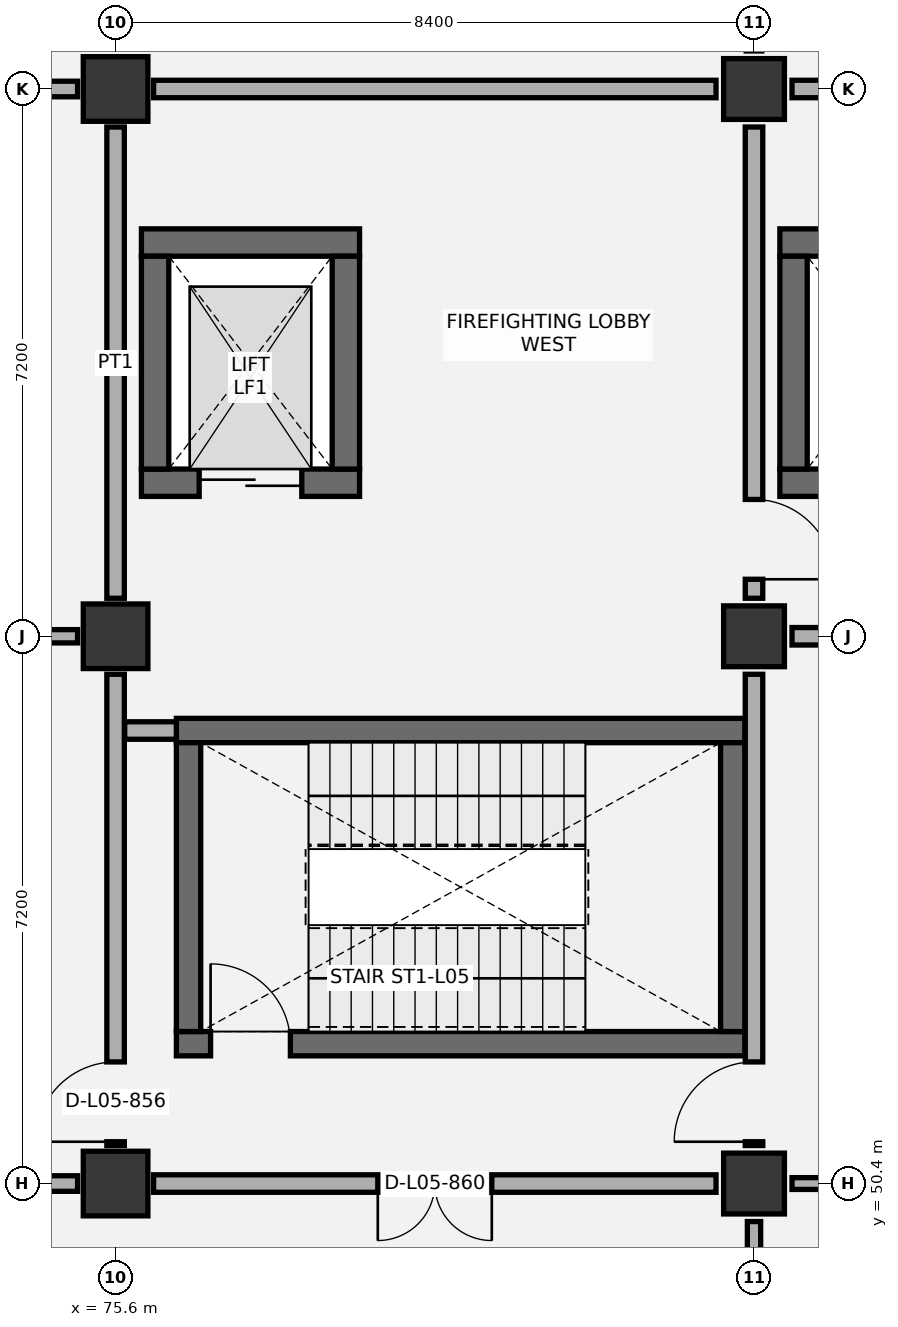
"""IFC4 building model, lengths in metres.
Left out: names, types, materials, properties, quantities, classifications, styles, units other than length and angle.
Written with IfcOpenShell. Run it as: python <this file> out.ifc"""

import sys

from ifc_helpers import new_model, si_unit, direction, frame, frame_2d, origin, origin_2d, place, context, subcontext, project, spatial, rectangle, extrude, element, fill, save


model = new_model("IFC4")
c1 = context("Model", 3, precision=1e-05, world=origin(), true_north=direction((0.0, 1.0)))
c2 = subcontext(c1, "Body", "Model", "MODEL_VIEW")
j1 = project(units=[si_unit("LENGTHUNIT", "METRE"), si_unit("PLANEANGLEUNIT", "RADIAN")], contexts=[c1])
p1 = place(None, origin())
s1 = spatial("IfcSite", under=j1, at=p1, CompositionType="ELEMENT")
p2 = place(p1, origin())
s2 = spatial("IfcBuilding", under=s1, at=p2, CompositionType="ELEMENT")
p3 = place(p2, frame((0.0, 0.0, 27.0)))
s3 = spatial("IfcBuildingStorey", under=s2, at=p3, CompositionType="ELEMENT", Elevation=27.0)
for number, where, z_axis, x_axis in (
    (1, (75.6, 50.4, 0.0), (0.0, 0.0, 1.0), (1.0, 0.0, 0.0)),
    (2, (75.6, 57.6, 0.0), (0.0, 0.0, 1.0), (1.0, 0.0, 0.0)),
    (3, (75.6, 64.8, 0.0), (0.0, 0.0, 1.0), (1.0, 0.0, 0.0)),
):
    element("IfcColumn", number, at=place(p3, frame(where, z_axis=z_axis, x_axis=x_axis)), inside=s3, PredefinedType="COLUMN", context=c2, shape_type="SweptSolid", body=[
        extrude(rectangle(XDim=0.85, YDim=0.85, at=origin_2d()), origin(), (0.0, 0.0, 1.0), 4.2),
    ])
for number, where, z_axis, x_axis in (
    (4, (84.0, 50.4, 0.0), (0.0, 0.0, 1.0), (1.0, 0.0, 0.0)),
    (5, (84.0, 57.6, 0.0), (0.0, 0.0, 1.0), (1.0, 0.0, 0.0)),
    (6, (84.0, 64.8, 0.0), (0.0, 0.0, 1.0), (1.0, 0.0, 0.0)),
):
    element("IfcColumn", number, at=place(p3, frame(where, z_axis=z_axis, x_axis=x_axis)), inside=s3, PredefinedType="COLUMN", context=c2, shape_type="SweptSolid", body=[
        extrude(rectangle(XDim=0.8, YDim=0.8, at=origin_2d()), origin(), (0.0, 0.0, 1.0), 4.2),
    ])
p4 = place(p3, frame((76.4, 52.24, 0.0), z_axis=(0.0, 0.0, 1.0), x_axis=(1.0, 0.0, 0.0)))
e7 = element("IfcWall", 7, at=p4, inside=s3, PredefinedType="SHEAR", context=c2, shape_type="SweptSolid", body=[
    extrude(rectangle(XDim=7.48, YDim=0.32, at=frame_2d((3.74, 0.0))), origin(), (0.0, 0.0, 1.0), 3.92),
])
p5 = place(p4, frame((0.45, 0.0, 0.0)))
e8 = element("IfcOpeningElement", 8, at=p5, cuts=e7, PredefinedType="OPENING", context=c2, shape_type="SweptSolid", body=[
    extrude(rectangle(XDim=1.05, YDim=2.15, at=frame_2d((0.525, 1.075))), frame((0.0, 0.17, 0.0), z_axis=(0.0, -1.0, 0.0), x_axis=(1.0, 0.0, 0.0)), (0.0, 0.0, 1.0), 0.34),
])
p6 = place(p3, frame((76.4, 56.36, 0.0), z_axis=(0.0, 0.0, 1.0), x_axis=(1.0, 0.0, 0.0)))
e9 = element("IfcWall", 9, at=p6, inside=s3, PredefinedType="SHEAR", context=c2, shape_type="SweptSolid", body=[
    extrude(rectangle(XDim=7.48, YDim=0.32, at=frame_2d((3.74, 0.0))), origin(), (0.0, 0.0, 1.0), 3.92),
])
for number, where, z_axis, x_axis in (
    (10, (76.56, 52.4, 0.0), (0.0, 0.0, 1.0), (0.0, 1.0, 0.0)),
    (11, (83.72, 52.4, 0.0), (0.0, 0.0, 1.0), (0.0, 1.0, 0.0)),
):
    element("IfcWall", number, at=place(p3, frame(where, z_axis=z_axis, x_axis=x_axis)), inside=s3, PredefinedType="SHEAR", context=c2, shape_type="SweptSolid", body=[
        extrude(rectangle(XDim=3.8, YDim=0.32, at=frame_2d((1.9, 0.0))), origin(), (0.0, 0.0, 1.0), 3.92),
    ])
p7 = place(p3, frame((75.94, 62.78, 0.0), z_axis=(0.0, 0.0, 1.0), x_axis=(1.0, 0.0, 0.0)))
e12 = element("IfcWall", 12, at=p7, inside=s3, PredefinedType="SHEAR", context=c2, shape_type="SweptSolid", body=[
    extrude(rectangle(XDim=2.87, YDim=0.36, at=frame_2d((1.435, 0.0))), origin(), (0.0, 0.0, 1.0), 3.92),
])
p8 = place(p3, frame((75.94, 59.62, 0.0), z_axis=(0.0, 0.0, 1.0), x_axis=(1.0, 0.0, 0.0)))
e13 = element("IfcWall", 13, at=p8, inside=s3, PredefinedType="SHEAR", context=c2, shape_type="SweptSolid", body=[
    extrude(rectangle(XDim=2.87, YDim=0.36, at=frame_2d((1.435, 0.0))), origin(), (0.0, 0.0, 1.0), 3.92),
])
p9 = place(p8, frame((0.76, 0.0, 0.0)))
e14 = element("IfcOpeningElement", 14, at=p9, cuts=e13, PredefinedType="OPENING", context=c2, shape_type="SweptSolid", body=[
    extrude(rectangle(XDim=1.35, YDim=2.2, at=frame_2d((0.675, 1.1))), frame((0.0, 0.19, 0.0), z_axis=(0.0, -1.0, 0.0), x_axis=(1.0, 0.0, 0.0)), (0.0, 0.0, 1.0), 0.38),
])
for number, where, z_axis, x_axis in (
    (15, (76.12, 59.8, 0.0), (0.0, 0.0, 1.0), (0.0, 1.0, 0.0)),
    (16, (78.63, 59.8, 0.0), (0.0, 0.0, 1.0), (0.0, 1.0, 0.0)),
):
    element("IfcWall", number, at=place(p3, frame(where, z_axis=z_axis, x_axis=x_axis)), inside=s3, PredefinedType="SHEAR", context=c2, shape_type="SweptSolid", body=[
        extrude(rectangle(XDim=2.8, YDim=0.36, at=frame_2d((1.4, 0.0))), origin(), (0.0, 0.0, 1.0), 3.92),
    ])
p10 = place(p3, frame((84.34, 62.78, 0.0), z_axis=(0.0, 0.0, 1.0), x_axis=(1.0, 0.0, 0.0)))
e17 = element("IfcWall", 17, at=p10, inside=s3, PredefinedType="SHEAR", context=c2, shape_type="SweptSolid", body=[
    extrude(rectangle(XDim=7.77, YDim=0.36, at=frame_2d((3.885, 0.0))), origin(), (0.0, 0.0, 1.0), 3.92),
])
p11 = place(p3, frame((84.34, 59.62, 0.0), z_axis=(0.0, 0.0, 1.0), x_axis=(1.0, 0.0, 0.0)))
e18 = element("IfcWall", 18, at=p11, inside=s3, PredefinedType="SHEAR", context=c2, shape_type="SweptSolid", body=[
    extrude(rectangle(XDim=2.66, YDim=0.36, at=frame_2d((1.33, 0.0))), origin(), (0.0, 0.0, 1.0), 3.92),
])
p12 = place(p11, frame((0.78, 0.0, 0.0)))
e19 = element("IfcOpeningElement", 19, at=p12, cuts=e18, PredefinedType="OPENING", context=c2, shape_type="SweptSolid", body=[
    extrude(rectangle(XDim=1.1, YDim=2.15, at=frame_2d((0.55, 1.075))), frame((0.0, 0.19, 0.0), z_axis=(0.0, -1.0, 0.0), x_axis=(1.0, 0.0, 0.0)), (0.0, 0.0, 1.0), 0.38),
])
p13 = place(p3, frame((84.52, 59.8, 0.0), z_axis=(0.0, 0.0, 1.0), x_axis=(0.0, 1.0, 0.0)))
e20 = element("IfcWall", 20, at=p13, inside=s3, PredefinedType="SHEAR", context=c2, shape_type="SweptSolid", body=[
    extrude(rectangle(XDim=2.8, YDim=0.36, at=frame_2d((1.4, 0.0))), origin(), (0.0, 0.0, 1.0), 3.92),
])
p14 = place(p3, frame((67.7, 50.4, 0.0), z_axis=(0.0, 0.0, 1.0), x_axis=(1.0, 0.0, 0.0)))
e21 = element("IfcWall", 21, at=p14, inside=s3, PredefinedType="PARTITIONING", context=c2, shape_type="SweptSolid", body=[
    extrude(rectangle(XDim=7.4, YDim=0.205, at=frame_2d((3.7, 0.0))), origin(), (0.0, 0.0, 1.0), 3.215),
])
p15 = place(p14, frame((2.95, 0.0, 0.0)))
e22 = element("IfcOpeningElement", 22, at=p15, cuts=e21, PredefinedType="OPENING", context=c2, shape_type="SweptSolid", body=[
    extrude(rectangle(XDim=1.5, YDim=2.2, at=frame_2d((0.75, 1.1))), frame((0.0, 0.113, 0.0), z_axis=(0.0, -1.0, 0.0), x_axis=(1.0, 0.0, 0.0)), (0.0, 0.0, 1.0), 0.225),
])
p16 = place(p3, frame((75.6, 50.9, 0.0), z_axis=(0.0, 0.0, 1.0), x_axis=(0.0, 1.0, 0.0)))
e23 = element("IfcWall", 23, at=p16, inside=s3, PredefinedType="PARTITIONING", context=c2, shape_type="SweptSolid", body=[
    extrude(rectangle(XDim=6.2, YDim=0.23, at=frame_2d((3.1, 0.0))), origin(), (0.0, 0.0, 1.0), 3.265),
])
p17 = place(p16, frame((0.05, 0.0, 0.0)))
e24 = element("IfcOpeningElement", 24, at=p17, cuts=e23, PredefinedType="OPENING", context=c2, shape_type="SweptSolid", body=[
    extrude(rectangle(XDim=1.05, YDim=2.15, at=frame_2d((0.525, 1.075))), frame((0.0, 0.125, 0.0), z_axis=(0.0, -1.0, 0.0), x_axis=(1.0, 0.0, 0.0)), (0.0, 0.0, 1.0), 0.25),
])
p18 = place(p3, frame((67.7, 57.6, 0.0), z_axis=(0.0, 0.0, 1.0), x_axis=(1.0, 0.0, 0.0)))
e25 = element("IfcWall", 25, at=p18, inside=s3, PredefinedType="PARTITIONING", context=c2, shape_type="SweptSolid", body=[
    extrude(rectangle(XDim=7.4, YDim=0.175, at=frame_2d((3.7, 0.0))), origin(), (0.0, 0.0, 1.0), 3.215),
])
p19 = place(p18, frame((2.975, 0.0, 0.0)))
e26 = element("IfcOpeningElement", 26, at=p19, cuts=e25, PredefinedType="OPENING", context=c2, shape_type="SweptSolid", body=[
    extrude(rectangle(XDim=1.45, YDim=2.2, at=frame_2d((0.725, 1.1))), frame((0.0, 0.097, 0.0), z_axis=(0.0, -1.0, 0.0), x_axis=(1.0, 0.0, 0.0)), (0.0, 0.0, 1.0), 0.195),
])
p20 = place(p3, frame((75.6, 58.1, 0.0), z_axis=(0.0, 0.0, 1.0), x_axis=(0.0, 1.0, 0.0)))
e27 = element("IfcWall", 27, at=p20, inside=s3, PredefinedType="PARTITIONING", context=c2, shape_type="SweptSolid", body=[
    extrude(rectangle(XDim=6.2, YDim=0.23, at=frame_2d((3.1, 0.0))), origin(), (0.0, 0.0, 1.0), 3.415),
])
p21 = place(p3, frame((67.7, 64.8, 0.0), z_axis=(0.0, 0.0, 1.0), x_axis=(1.0, 0.0, 0.0)))
e28 = element("IfcWall", 28, at=p21, inside=s3, PredefinedType="PARTITIONING", context=c2, shape_type="SweptSolid", body=[
    extrude(rectangle(XDim=7.4, YDim=0.205, at=frame_2d((3.7, 0.0))), origin(), (0.0, 0.0, 1.0), 3.215),
])
p22 = place(p21, frame((3.025, 0.0, 0.0)))
e29 = element("IfcOpeningElement", 29, at=p22, cuts=e28, PredefinedType="OPENING", context=c2, shape_type="SweptSolid", body=[
    extrude(rectangle(XDim=1.35, YDim=2.15, at=frame_2d((0.675, 1.075))), frame((0.0, 0.113, 0.0), z_axis=(0.0, -1.0, 0.0), x_axis=(1.0, 0.0, 0.0)), (0.0, 0.0, 1.0), 0.225),
])
p23 = place(p3, frame((84.0, 43.7, 0.0), z_axis=(0.0, 0.0, 1.0), x_axis=(0.0, 1.0, 0.0)))
e30 = element("IfcWall", 30, at=p23, inside=s3, PredefinedType="PARTITIONING", context=c2, shape_type="SweptSolid", body=[
    extrude(rectangle(XDim=6.2, YDim=0.175, at=frame_2d((3.1, 0.0))), origin(), (0.0, 0.0, 1.0), 3.265),
])
p24 = place(p23, frame((2.475, 0.0, 0.0)))
e31 = element("IfcOpeningElement", 31, at=p24, cuts=e30, PredefinedType="OPENING", context=c2, shape_type="SweptSolid", body=[
    extrude(rectangle(XDim=1.25, YDim=2.1, at=frame_2d((0.625, 1.05))), frame((0.0, 0.097, 0.0), z_axis=(0.0, -1.0, 0.0), x_axis=(1.0, 0.0, 0.0)), (0.0, 0.0, 1.0), 0.195),
])
p25 = place(p3, frame((76.1, 50.4, 0.0), z_axis=(0.0, 0.0, 1.0), x_axis=(1.0, 0.0, 0.0)))
e32 = element("IfcWall", 32, at=p25, inside=s3, PredefinedType="PARTITIONING", context=c2, shape_type="SweptSolid", body=[
    extrude(rectangle(XDim=7.4, YDim=0.23, at=frame_2d((3.7, 0.0))), origin(), (0.0, 0.0, 1.0), 3.465),
])
p26 = place(p25, frame((2.95, 0.0, 0.0)))
e33 = element("IfcOpeningElement", 33, at=p26, cuts=e32, PredefinedType="OPENING", context=c2, shape_type="SweptSolid", body=[
    extrude(rectangle(XDim=1.5, YDim=2.15, at=frame_2d((0.75, 1.075))), frame((0.0, 0.125, 0.0), z_axis=(0.0, -1.0, 0.0), x_axis=(1.0, 0.0, 0.0)), (0.0, 0.0, 1.0), 0.25),
])
p27 = place(p3, frame((84.0, 50.9, 0.0), z_axis=(0.0, 0.0, 1.0), x_axis=(0.0, 1.0, 0.0)))
e34 = element("IfcWall", 34, at=p27, inside=s3, PredefinedType="PARTITIONING", context=c2, shape_type="SweptSolid", body=[
    extrude(rectangle(XDim=6.2, YDim=0.23, at=frame_2d((3.1, 0.0))), origin(), (0.0, 0.0, 1.0), 3.415),
])
p28 = place(p27, frame((0.05, 0.0, 0.0)))
e35 = element("IfcOpeningElement", 35, at=p28, cuts=e34, PredefinedType="OPENING", context=c2, shape_type="SweptSolid", body=[
    extrude(rectangle(XDim=1.05, YDim=2.15, at=frame_2d((0.525, 1.075))), frame((0.0, 0.125, 0.0), z_axis=(0.0, -1.0, 0.0), x_axis=(1.0, 0.0, 0.0)), (0.0, 0.0, 1.0), 0.25),
])
p29 = place(p3, frame((75.72, 56.36, 0.0), z_axis=(0.0, 0.0, 1.0), x_axis=(1.0, 0.0, 0.0)))
e36 = element("IfcWall", 36, at=p29, inside=s3, PredefinedType="PARTITIONING", context=c2, shape_type="SweptSolid", body=[
    extrude(rectangle(XDim=0.68, YDim=0.23, at=frame_2d((0.34, 0.0))), origin(), (0.0, 0.0, 1.0), 3.92),
])
p30 = place(p3, frame((84.0, 58.1, 0.0), z_axis=(0.0, 0.0, 1.0), x_axis=(0.0, 1.0, 0.0)))
e37 = element("IfcWall", 37, at=p30, inside=s3, PredefinedType="PARTITIONING", context=c2, shape_type="SweptSolid", body=[
    extrude(rectangle(XDim=6.2, YDim=0.23, at=frame_2d((3.1, 0.0))), origin(), (0.0, 0.0, 1.0), 3.265),
])
p31 = place(p30, frame((0.25, 0.0, 0.0)))
e38 = element("IfcOpeningElement", 38, at=p31, cuts=e37, PredefinedType="OPENING", context=c2, shape_type="SweptSolid", body=[
    extrude(rectangle(XDim=1.05, YDim=2.15, at=frame_2d((0.525, 1.075))), frame((0.0, 0.125, 0.0), z_axis=(0.0, -1.0, 0.0), x_axis=(1.0, 0.0, 0.0)), (0.0, 0.0, 1.0), 0.25),
])
p32 = place(p3, frame((76.1, 64.8, 0.0), z_axis=(0.0, 0.0, 1.0), x_axis=(1.0, 0.0, 0.0)))
e39 = element("IfcWall", 39, at=p32, inside=s3, PredefinedType="PARTITIONING", context=c2, shape_type="SweptSolid", body=[
    extrude(rectangle(XDim=7.4, YDim=0.23, at=frame_2d((3.7, 0.0))), origin(), (0.0, 0.0, 1.0), 3.465),
])
p33 = place(p3, frame((84.5, 50.4, 0.0), z_axis=(0.0, 0.0, 1.0), x_axis=(1.0, 0.0, 0.0)))
e40 = element("IfcWall", 40, at=p33, inside=s3, PredefinedType="PARTITIONING", context=c2, shape_type="SweptSolid", body=[
    extrude(rectangle(XDim=7.4, YDim=0.155, at=frame_2d((3.7, 0.0))), origin(), (0.0, 0.0, 1.0), 3.515),
])
p34 = place(p33, frame((3.15, 0.0, 0.0)))
e41 = element("IfcOpeningElement", 41, at=p34, cuts=e40, PredefinedType="OPENING", context=c2, shape_type="SweptSolid", body=[
    extrude(rectangle(XDim=1.1, YDim=2.1, at=frame_2d((0.55, 1.05))), frame((0.0, 0.087, 0.0), z_axis=(0.0, -1.0, 0.0), x_axis=(1.0, 0.0, 0.0)), (0.0, 0.0, 1.0), 0.175),
])
p35 = place(p3, frame((84.5, 57.6, 0.0), z_axis=(0.0, 0.0, 1.0), x_axis=(1.0, 0.0, 0.0)))
e42 = element("IfcWall", 42, at=p35, inside=s3, PredefinedType="PARTITIONING", context=c2, shape_type="SweptSolid", body=[
    extrude(rectangle(XDim=7.4, YDim=0.23, at=frame_2d((3.7, 0.0))), origin(), (0.0, 0.0, 1.0), 3.515),
])
p36 = place(p35, frame((2.95, 0.0, 0.0)))
e43 = element("IfcOpeningElement", 43, at=p36, cuts=e42, PredefinedType="OPENING", context=c2, shape_type="SweptSolid", body=[
    extrude(rectangle(XDim=1.5, YDim=2.15, at=frame_2d((0.75, 1.075))), frame((0.0, 0.125, 0.0), z_axis=(0.0, -1.0, 0.0), x_axis=(1.0, 0.0, 0.0)), (0.0, 0.0, 1.0), 0.25),
])
p37 = place(p3, frame((84.5, 64.8, 0.0), z_axis=(0.0, 0.0, 1.0), x_axis=(1.0, 0.0, 0.0)))
e44 = element("IfcWall", 44, at=p37, inside=s3, PredefinedType="PARTITIONING", context=c2, shape_type="SweptSolid", body=[
    extrude(rectangle(XDim=7.4, YDim=0.23, at=frame_2d((3.7, 0.0))), origin(), (0.0, 0.0, 1.0), 3.515),
])
p38 = place(p5, origin())
e45 = element("IfcDoor", 45, at=p38, inside=s3, OperationType="SINGLE_SWING_LEFT", PredefinedType="DOOR", context=c2, shape_type="SweptSolid", body=[
    extrude(rectangle(XDim=1.05, YDim=2.15, at=frame_2d((0.525, 1.075))), frame((0.0, 0.025, 0.0), z_axis=(0.0, -1.0, 0.0), x_axis=(1.0, 0.0, 0.0)), (0.0, 0.0, 1.0), 0.05),
])
fill(e8, e45)
p39 = place(p9, origin())
e46 = element("IfcDoor", 46, at=p39, inside=s3, OperationType="DOUBLE_DOOR_SLIDING", PredefinedType="DOOR", context=c2, shape_type="SweptSolid", body=[
    extrude(rectangle(XDim=1.35, YDim=2.2, at=frame_2d((0.675, 1.1))), frame((0.0, 0.025, 0.0), z_axis=(0.0, -1.0, 0.0), x_axis=(1.0, 0.0, 0.0)), (0.0, 0.0, 1.0), 0.05),
])
fill(e14, e46)
p40 = place(p17, origin())
e47 = element("IfcDoor", 47, at=p40, inside=s3, OperationType="SINGLE_SWING_LEFT", PredefinedType="DOOR", context=c2, shape_type="SweptSolid", body=[
    extrude(rectangle(XDim=1.05, YDim=2.15, at=frame_2d((0.525, 1.075))), frame((0.0, 0.025, 0.0), z_axis=(0.0, -1.0, 0.0), x_axis=(1.0, 0.0, 0.0)), (0.0, 0.0, 1.0), 0.05),
])
fill(e24, e47)
p41 = place(p26, frame((1.5, 0.0, 0.0), z_axis=(0.0, 0.0, 1.0), x_axis=(-1.0, 0.0, 0.0)))
e48 = element("IfcDoor", 48, at=p41, inside=s3, OperationType="DOUBLE_DOOR_SINGLE_SWING", PredefinedType="DOOR", context=c2, shape_type="SweptSolid", body=[
    extrude(rectangle(XDim=1.5, YDim=2.15, at=frame_2d((0.75, 1.075))), frame((0.0, 0.025, 0.0), z_axis=(0.0, -1.0, 0.0), x_axis=(1.0, 0.0, 0.0)), (0.0, 0.0, 1.0), 0.05),
])
fill(e33, e48)
p42 = place(p28, origin())
e49 = element("IfcDoor", 49, at=p42, inside=s3, OperationType="SINGLE_SWING_LEFT", PredefinedType="DOOR", context=c2, shape_type="SweptSolid", body=[
    extrude(rectangle(XDim=1.05, YDim=2.15, at=frame_2d((0.525, 1.075))), frame((0.0, 0.025, 0.0), z_axis=(0.0, -1.0, 0.0), x_axis=(1.0, 0.0, 0.0)), (0.0, 0.0, 1.0), 0.05),
])
fill(e35, e49)
p43 = place(p31, frame((1.05, 0.0, 0.0), z_axis=(0.0, 0.0, 1.0), x_axis=(-1.0, 0.0, 0.0)))
e50 = element("IfcDoor", 50, at=p43, inside=s3, OperationType="SINGLE_SWING_RIGHT", PredefinedType="DOOR", context=c2, shape_type="SweptSolid", body=[
    extrude(rectangle(XDim=1.05, YDim=2.15, at=frame_2d((0.525, 1.075))), frame((0.0, 0.025, 0.0), z_axis=(0.0, -1.0, 0.0), x_axis=(1.0, 0.0, 0.0)), (0.0, 0.0, 1.0), 0.05),
])
fill(e38, e50)
save(model, sys.argv[1])
